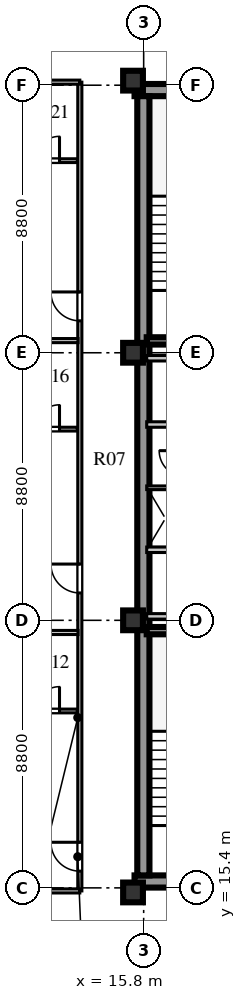
"""IFC4 building model, lengths in metres.
Left out: names, types, materials, properties, quantities, classifications, styles, units other than length and angle.
Written with IfcOpenShell. Run it as: python <this file> out.ifc"""

import sys

from ifc_helpers import new_model, si_unit, direction, frame, frame_2d, origin, origin_2d, place, context, subcontext, project, spatial, rectangle, extrude, element, fill, save


model = new_model("IFC4")
c1 = context("Model", 3, precision=1e-05, world=origin(), true_north=direction((0.0, 1.0)))
c2 = subcontext(c1, "Body", "Model", "MODEL_VIEW")
j1 = project(units=[si_unit("LENGTHUNIT", "METRE"), si_unit("PLANEANGLEUNIT", "RADIAN")], contexts=[c1])
p1 = place(None, origin())
s1 = spatial("IfcSite", under=j1, at=p1, CompositionType="ELEMENT")
p2 = place(p1, origin())
s2 = spatial("IfcBuilding", under=s1, at=p2, CompositionType="ELEMENT")
p3 = place(p2, frame((0.0, 0.0, 229.7)))
s3 = spatial("IfcBuildingStorey", under=s2, at=p3, CompositionType="ELEMENT", Elevation=229.7)
for number, where, z_axis, x_axis in (
    (1, (15.5, 15.61, 0.0), (0.0, 0.0, 1.0), (1.0, 0.0, 0.0)),
    (2, (15.5, 41.64, 0.0), (0.0, 0.0, 1.0), (1.0, 0.0, 0.0)),
):
    element("IfcWall", number, at=place(p3, frame(where, z_axis=z_axis, x_axis=x_axis)), inside=s3, PredefinedType="SHEAR", context=c2, shape_type="SweptSolid", body=[
        extrude(rectangle(XDim=9.48, YDim=0.4, at=frame_2d((4.74, 0.0))), origin(), (0.0, 0.0, 1.0), 3.66),
    ])
p4 = place(p3, frame((15.79, 15.81, 0.0), z_axis=(0.0, 0.0, 1.0), x_axis=(0.0, 1.0, 0.0)))
e3 = element("IfcWall", 3, at=p4, inside=s3, PredefinedType="SHEAR", context=c2, shape_type="SweptSolid", body=[
    extrude(rectangle(XDim=25.63, YDim=0.4, at=frame_2d((12.815, 0.0))), origin(), (0.0, 0.0, 1.0), 3.66),
])
for number, where, z_axis, x_axis in (
    (4, (15.45, 15.25, 0.0), (0.0, 0.0, 1.0), (1.0, 0.0, 0.0)),
    (5, (15.45, 24.2, 0.0), (0.0, 0.0, 1.0), (1.0, 0.0, 0.0)),
    (6, (15.45, 33.0, 0.0), (0.0, 0.0, 1.0), (1.0, 0.0, 0.0)),
    (7, (15.45, 41.95, 0.0), (0.0, 0.0, 1.0), (1.0, 0.0, 0.0)),
):
    element("IfcColumn", number, at=place(p3, frame(where, z_axis=z_axis, x_axis=x_axis)), inside=s3, PredefinedType="COLUMN", context=c2, shape_type="SweptSolid", body=[
        extrude(rectangle(XDim=0.65, YDim=0.65, at=origin_2d()), origin(), (0.0, 0.0, 1.0), 3.66),
    ])
p5 = place(p3, frame((15.9, 23.86, 0.0), z_axis=(0.0, 0.0, 1.0), x_axis=(1.0, 0.0, 0.0)))
e8 = element("IfcWall", 8, at=p5, inside=s3, PredefinedType="SHEAR", context=c2, shape_type="SweptSolid", body=[
    extrude(rectangle(XDim=3.52, YDim=0.24, at=frame_2d((1.76, 0.0))), origin(), (0.0, 0.0, 1.0), 3.9),
])
p6 = place(p3, frame((15.9, 26.52, 0.0), z_axis=(0.0, 0.0, 1.0), x_axis=(1.0, 0.0, 0.0)))
e9 = element("IfcWall", 9, at=p6, inside=s3, PredefinedType="SOLIDWALL", context=c2, shape_type="SweptSolid", body=[
    extrude(rectangle(XDim=8.68, YDim=0.18, at=frame_2d((4.34, 0.0))), origin(), (0.0, 0.0, 1.0), 3.66),
])
p7 = place(p6, frame((2.05, 0.0, 0.0)))
e10 = element("IfcOpeningElement", 10, at=p7, cuts=e9, PredefinedType="OPENING", context=c2, shape_type="SweptSolid", body=[
    extrude(rectangle(XDim=0.85, YDim=2.06, at=frame_2d((0.425, 1.03))), frame((0.0, 0.1, 0.0), z_axis=(0.0, -1.0, 0.0), x_axis=(1.0, 0.0, 0.0)), (0.0, 0.0, 1.0), 0.2),
])
p8 = place(p6, frame((5.2, 0.0, 0.0)))
e11 = element("IfcOpeningElement", 11, at=p8, cuts=e9, PredefinedType="OPENING", context=c2, shape_type="SweptSolid", body=[
    extrude(rectangle(XDim=0.95, YDim=2.1, at=frame_2d((0.475, 1.05))), frame((0.0, 0.1, 0.0), z_axis=(0.0, -1.0, 0.0), x_axis=(1.0, 0.0, 0.0)), (0.0, 0.0, 1.0), 0.2),
])
p9 = place(p3, frame((15.9, 24.33, 0.0), z_axis=(0.0, 0.0, 1.0), x_axis=(1.0, 0.0, 0.0)))
e12 = element("IfcWall", 12, at=p9, inside=s3, PredefinedType="SOLIDWALL", context=c2, shape_type="SweptSolid", body=[
    extrude(rectangle(XDim=8.68, YDim=0.18, at=frame_2d((4.34, 0.0))), origin(), (0.0, 0.0, 1.0), 3.06),
])
p10 = place(p3, frame((15.9, 28.56, 0.0), z_axis=(0.0, 0.0, 1.0), x_axis=(1.0, 0.0, 0.0)))
e13 = element("IfcWall", 13, at=p10, inside=s3, PredefinedType="PARTITIONING", context=c2, shape_type="SweptSolid", body=[
    extrude(rectangle(XDim=1.2, YDim=0.12, at=frame_2d((0.6, 0.0))), origin(), (0.0, 0.0, 1.0), 3.66),
])
p11 = place(p3, frame((15.9, 30.64, 0.0), z_axis=(0.0, 0.0, 1.0), x_axis=(1.0, 0.0, 0.0)))
e14 = element("IfcWall", 14, at=p11, inside=s3, PredefinedType="SOLIDWALL", context=c2, shape_type="SweptSolid", body=[
    extrude(rectangle(XDim=8.68, YDim=0.18, at=frame_2d((4.34, 0.0))), origin(), (0.0, 0.0, 1.0), 3.66),
])
p12 = place(p11, frame((3.7, 0.0, 0.0)))
e15 = element("IfcOpeningElement", 15, at=p12, cuts=e14, PredefinedType="OPENING", context=c2, shape_type="SweptSolid", body=[
    extrude(rectangle(XDim=0.95, YDim=2.1, at=frame_2d((0.475, 1.05))), frame((0.0, 0.1, 0.0), z_axis=(0.0, -1.0, 0.0), x_axis=(1.0, 0.0, 0.0)), (0.0, 0.0, 1.0), 0.2),
])
p13 = place(p3, frame((15.9, 32.82, 0.0), z_axis=(0.0, 0.0, 1.0), x_axis=(1.0, 0.0, 0.0)))
e16 = element("IfcWall", 16, at=p13, inside=s3, PredefinedType="SOLIDWALL", context=c2, shape_type="SweptSolid", body=[
    extrude(rectangle(XDim=8.68, YDim=0.18, at=frame_2d((4.34, 0.0))), origin(), (0.0, 0.0, 1.0), 3.06),
])
p14 = place(p3, frame((15.9, 33.39, 0.0), z_axis=(0.0, 0.0, 1.0), x_axis=(1.0, 0.0, 0.0)))
e17 = element("IfcWall", 17, at=p14, inside=s3, PredefinedType="SHEAR", context=c2, shape_type="SweptSolid", body=[
    extrude(rectangle(XDim=3.52, YDim=0.24, at=frame_2d((1.76, 0.0))), origin(), (0.0, 0.0, 1.0), 3.9),
])
p15 = place(p3, frame((13.7, 15.3, 0.0), z_axis=(0.0, 0.0, 1.0), x_axis=(0.0, 1.0, 0.0)))
e18 = element("IfcWall", 18, at=p15, inside=s3, PredefinedType="PARTITIONING", context=c2, shape_type="SweptSolid", body=[
    extrude(rectangle(XDim=26.6, YDim=0.135, at=frame_2d((13.3, 0.0))), origin(), (0.0, 0.0, 1.0), 3.66),
])
p16 = place(p15, frame((0.65, 0.0, 0.0)))
e19 = element("IfcOpeningElement", 19, at=p16, cuts=e18, PredefinedType="OPENING", context=c2, shape_type="SweptSolid", body=[
    extrude(rectangle(XDim=0.95, YDim=2.1, at=frame_2d((0.475, 1.05))), frame((0.0, 0.078, 0.0), z_axis=(0.0, -1.0, 0.0), x_axis=(1.0, 0.0, 0.0)), (0.0, 0.0, 1.0), 0.155),
])
p17 = place(p15, frame((9.8, 0.0, 0.0)))
e20 = element("IfcOpeningElement", 20, at=p17, cuts=e18, PredefinedType="OPENING", context=c2, shape_type="SweptSolid", body=[
    extrude(rectangle(XDim=0.95, YDim=2.1, at=frame_2d((0.475, 1.05))), frame((0.0, 0.078, 0.0), z_axis=(0.0, -1.0, 0.0), x_axis=(1.0, 0.0, 0.0)), (0.0, 0.0, 1.0), 0.155),
])
p18 = place(p15, frame((18.75, 0.0, 0.0)))
e21 = element("IfcOpeningElement", 21, at=p18, cuts=e18, PredefinedType="OPENING", context=c2, shape_type="SweptSolid", body=[
    extrude(rectangle(XDim=0.95, YDim=2.1, at=frame_2d((0.475, 1.05))), frame((0.0, 0.078, 0.0), z_axis=(0.0, -1.0, 0.0), x_axis=(1.0, 0.0, 0.0)), (0.0, 0.0, 1.0), 0.155),
])
for number, where, z_axis, x_axis in (
    (22, (8.08, 15.3, 0.0), (0.0, 0.0, 1.0), (1.0, 0.0, 0.0)),
    (23, (8.08, 41.9, 0.0), (0.0, 0.0, 1.0), (1.0, 0.0, 0.0)),
):
    element("IfcWall", number, at=place(p3, frame(where, z_axis=z_axis, x_axis=x_axis)), inside=s3, PredefinedType="PARTITIONING", context=c2, shape_type="SweptSolid", body=[
        extrude(rectangle(XDim=5.62, YDim=0.135, at=frame_2d((2.81, 0.0))), origin(), (0.0, 0.0, 1.0), 3.21),
    ])
p19 = place(p3, frame((10.45, 21.218, 0.0), z_axis=(0.0, 0.0, 1.0), x_axis=(1.0, 0.0, 0.0)))
e24 = element("IfcWall", 24, at=p19, inside=s3, PredefinedType="PLUMBINGWALL", context=c2, shape_type="SweptSolid", body=[
    extrude(rectangle(XDim=3.17, YDim=0.125, at=frame_2d((1.585, 0.0))), origin(), (0.0, 0.0, 1.0), 3.66),
])
p20 = place(p19, frame((0.16, 0.0, 0.0)))
e25 = element("IfcOpeningElement", 25, at=p20, cuts=e24, PredefinedType="OPENING", context=c2, shape_type="SweptSolid", body=[
    extrude(rectangle(XDim=0.8, YDim=2.05, at=frame_2d((0.4, 1.025))), frame((0.0, 0.073, 0.0), z_axis=(0.0, -1.0, 0.0), x_axis=(1.0, 0.0, 0.0)), (0.0, 0.0, 1.0), 0.145),
])
p21 = place(p19, frame((1.782, 0.0, 0.0)))
e26 = element("IfcOpeningElement", 26, at=p21, cuts=e24, PredefinedType="OPENING", context=c2, shape_type="SweptSolid", body=[
    extrude(rectangle(XDim=0.8, YDim=2.05, at=frame_2d((0.4, 1.025))), frame((0.0, 0.073, 0.0), z_axis=(0.0, -1.0, 0.0), x_axis=(1.0, 0.0, 0.0)), (0.0, 0.0, 1.0), 0.145),
])
p22 = place(p3, frame((8.08, 23.8, 0.0), z_axis=(0.0, 0.0, 1.0), x_axis=(1.0, 0.0, 0.0)))
e27 = element("IfcWall", 27, at=p22, inside=s3, PredefinedType="PARTITIONING", context=c2, shape_type="SweptSolid", body=[
    extrude(rectangle(XDim=5.56, YDim=0.135, at=frame_2d((2.78, 0.0))), origin(), (0.0, 0.0, 1.0), 3.66),
])
p23 = place(p3, frame((10.45, 30.488, 0.0), z_axis=(0.0, 0.0, 1.0), x_axis=(1.0, 0.0, 0.0)))
e28 = element("IfcWall", 28, at=p23, inside=s3, PredefinedType="PLUMBINGWALL", context=c2, shape_type="SweptSolid", body=[
    extrude(rectangle(XDim=3.17, YDim=0.125, at=frame_2d((1.585, 0.0))), origin(), (0.0, 0.0, 1.0), 3.66),
])
p24 = place(p23, frame((0.16, 0.0, 0.0)))
e29 = element("IfcOpeningElement", 29, at=p24, cuts=e28, PredefinedType="OPENING", context=c2, shape_type="SweptSolid", body=[
    extrude(rectangle(XDim=0.8, YDim=2.05, at=frame_2d((0.4, 1.025))), frame((0.0, 0.073, 0.0), z_axis=(0.0, -1.0, 0.0), x_axis=(1.0, 0.0, 0.0)), (0.0, 0.0, 1.0), 0.145),
])
p25 = place(p23, frame((1.782, 0.0, 0.0)))
e30 = element("IfcOpeningElement", 30, at=p25, cuts=e28, PredefinedType="OPENING", context=c2, shape_type="SweptSolid", body=[
    extrude(rectangle(XDim=0.8, YDim=2.05, at=frame_2d((0.4, 1.025))), frame((0.0, 0.073, 0.0), z_axis=(0.0, -1.0, 0.0), x_axis=(1.0, 0.0, 0.0)), (0.0, 0.0, 1.0), 0.145),
])
p26 = place(p3, frame((8.08, 33.4, 0.0), z_axis=(0.0, 0.0, 1.0), x_axis=(1.0, 0.0, 0.0)))
e31 = element("IfcWall", 31, at=p26, inside=s3, PredefinedType="PARTITIONING", context=c2, shape_type="SweptSolid", body=[
    extrude(rectangle(XDim=5.56, YDim=0.135, at=frame_2d((2.78, 0.0))), origin(), (0.0, 0.0, 1.0), 3.66),
])
p27 = place(p3, frame((10.45, 39.318, 0.0), z_axis=(0.0, 0.0, 1.0), x_axis=(1.0, 0.0, 0.0)))
e32 = element("IfcWall", 32, at=p27, inside=s3, PredefinedType="PLUMBINGWALL", context=c2, shape_type="SweptSolid", body=[
    extrude(rectangle(XDim=3.17, YDim=0.125, at=frame_2d((1.585, 0.0))), origin(), (0.0, 0.0, 1.0), 3.66),
])
p28 = place(p27, frame((0.16, 0.0, 0.0)))
e33 = element("IfcOpeningElement", 33, at=p28, cuts=e32, PredefinedType="OPENING", context=c2, shape_type="SweptSolid", body=[
    extrude(rectangle(XDim=0.8, YDim=2.05, at=frame_2d((0.4, 1.025))), frame((0.0, 0.073, 0.0), z_axis=(0.0, -1.0, 0.0), x_axis=(1.0, 0.0, 0.0)), (0.0, 0.0, 1.0), 0.145),
])
p29 = place(p27, frame((1.782, 0.0, 0.0)))
e34 = element("IfcOpeningElement", 34, at=p29, cuts=e32, PredefinedType="OPENING", context=c2, shape_type="SweptSolid", body=[
    extrude(rectangle(XDim=0.8, YDim=2.05, at=frame_2d((0.4, 1.025))), frame((0.0, 0.073, 0.0), z_axis=(0.0, -1.0, 0.0), x_axis=(1.0, 0.0, 0.0)), (0.0, 0.0, 1.0), 0.145),
])
p30 = place(p21, origin())
e35 = element("IfcDoor", 35, at=p30, inside=s3, OperationType="SINGLE_SWING_RIGHT", PredefinedType="DOOR", context=c2, shape_type="SweptSolid", body=[
    extrude(rectangle(XDim=0.8, YDim=2.05, at=frame_2d((0.4, 1.025))), frame((0.0, 0.025, 0.0), z_axis=(0.0, -1.0, 0.0), x_axis=(1.0, 0.0, 0.0)), (0.0, 0.0, 1.0), 0.05),
])
fill(e26, e35)
p31 = place(p16, frame((0.95, 0.0, 0.0), z_axis=(0.0, 0.0, 1.0), x_axis=(-1.0, 0.0, 0.0)))
e36 = element("IfcDoor", 36, at=p31, inside=s3, OperationType="SINGLE_SWING_LEFT", PredefinedType="DOOR", context=c2, shape_type="SweptSolid", body=[
    extrude(rectangle(XDim=0.95, YDim=2.1, at=frame_2d((0.475, 1.05))), frame((0.0, 0.025, 0.0), z_axis=(0.0, -1.0, 0.0), x_axis=(1.0, 0.0, 0.0)), (0.0, 0.0, 1.0), 0.05),
])
fill(e19, e36)
p32 = place(p25, origin())
e37 = element("IfcDoor", 37, at=p32, inside=s3, OperationType="SINGLE_SWING_RIGHT", PredefinedType="DOOR", context=c2, shape_type="SweptSolid", body=[
    extrude(rectangle(XDim=0.8, YDim=2.05, at=frame_2d((0.4, 1.025))), frame((0.0, 0.025, 0.0), z_axis=(0.0, -1.0, 0.0), x_axis=(1.0, 0.0, 0.0)), (0.0, 0.0, 1.0), 0.05),
])
fill(e30, e37)
p33 = place(p17, frame((0.95, 0.0, 0.0), z_axis=(0.0, 0.0, 1.0), x_axis=(-1.0, 0.0, 0.0)))
e38 = element("IfcDoor", 38, at=p33, inside=s3, OperationType="SINGLE_SWING_LEFT", PredefinedType="DOOR", context=c2, shape_type="SweptSolid", body=[
    extrude(rectangle(XDim=0.95, YDim=2.1, at=frame_2d((0.475, 1.05))), frame((0.0, 0.025, 0.0), z_axis=(0.0, -1.0, 0.0), x_axis=(1.0, 0.0, 0.0)), (0.0, 0.0, 1.0), 0.05),
])
fill(e20, e38)
p34 = place(p29, origin())
e39 = element("IfcDoor", 39, at=p34, inside=s3, OperationType="SINGLE_SWING_RIGHT", PredefinedType="DOOR", context=c2, shape_type="SweptSolid", body=[
    extrude(rectangle(XDim=0.8, YDim=2.05, at=frame_2d((0.4, 1.025))), frame((0.0, 0.025, 0.0), z_axis=(0.0, -1.0, 0.0), x_axis=(1.0, 0.0, 0.0)), (0.0, 0.0, 1.0), 0.05),
])
fill(e34, e39)
p35 = place(p18, frame((0.95, 0.0, 0.0), z_axis=(0.0, 0.0, 1.0), x_axis=(-1.0, 0.0, 0.0)))
e40 = element("IfcDoor", 40, at=p35, inside=s3, OperationType="SINGLE_SWING_LEFT", PredefinedType="DOOR", context=c2, shape_type="SweptSolid", body=[
    extrude(rectangle(XDim=0.95, YDim=2.1, at=frame_2d((0.475, 1.05))), frame((0.0, 0.025, 0.0), z_axis=(0.0, -1.0, 0.0), x_axis=(1.0, 0.0, 0.0)), (0.0, 0.0, 1.0), 0.05),
])
fill(e21, e40)
save(model, sys.argv[1])
